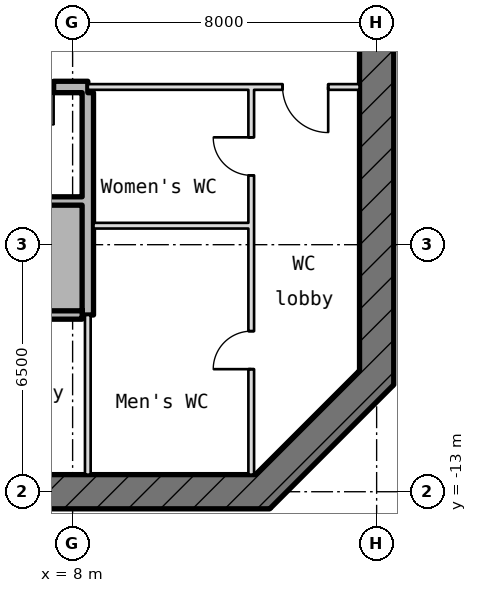
"""IFC4 building model, lengths in metres.
Left out: names, types, materials, properties, quantities, classifications, styles, units other than length and angle.
Written with IfcOpenShell. Run it as: python <this file> out.ifc"""

import sys

from ifc_helpers import new_model, si_unit, direction, frame, frame_2d, origin, place, context, subcontext, project, spatial, rectangle, extrude, element, fill, save


model = new_model("IFC4")
c1 = context("Model", 3, precision=1e-05, world=origin(), true_north=direction((0.0, 1.0)))
c2 = subcontext(c1, "Body", "Model", "MODEL_VIEW")
j1 = project(units=[si_unit("LENGTHUNIT", "METRE"), si_unit("PLANEANGLEUNIT", "RADIAN")], contexts=[c1])
p1 = place(None, origin())
s1 = spatial("IfcSite", under=j1, at=p1, CompositionType="ELEMENT")
p2 = place(p1, origin())
s2 = spatial("IfcBuilding", under=s1, at=p2, CompositionType="ELEMENT")
p3 = place(p2, frame((0.0, 0.0, 161.05)))
s3 = spatial("IfcBuildingStorey", under=s2, at=p3, CompositionType="ELEMENT", Elevation=161.05)
p4 = place(p3, frame((12.868, -13.132, -0.18), z_axis=(0.0, 0.0, 1.0), x_axis=(0.707106781187, 0.707106781187, 0.0)))
e1 = element("IfcWall", 1, at=p4, inside=s3, PredefinedType="SHEAR", context=c2, shape_type="SweptSolid", body=[
    extrude(rectangle(XDim=4.615, YDim=0.9, at=frame_2d((2.308, 0.0))), origin(), (0.0, 0.0, 1.0), 4.15),
])
p5 = place(p3, frame((16.0, -10.186, -0.18), z_axis=(0.0, 0.0, 1.0), x_axis=(0.0, 1.0, 0.0)))
e2 = element("IfcWall", 2, at=p5, inside=s3, PredefinedType="SHEAR", context=c2, shape_type="SweptSolid", body=[
    extrude(rectangle(XDim=20.373, YDim=0.9, at=frame_2d((10.186, 0.0))), origin(), (0.0, 0.0, 1.0), 4.15),
])
p6 = place(p5, frame((8.986, 0.0, 0.18)))
e3 = element("IfcOpeningElement", 3, at=p6, cuts=e2, PredefinedType="OPENING", context=c2, shape_type="SweptSolid", body=[
    extrude(rectangle(XDim=2.4, YDim=2.1, at=frame_2d((1.2, 1.05))), frame((0.0, 0.46, 0.0), z_axis=(0.0, -1.0, 0.0), x_axis=(1.0, 0.0, 0.0)), (0.0, 0.0, 1.0), 0.92),
])
p7 = place(p5, frame((13.586, 0.0, 0.18)))
e4 = element("IfcOpeningElement", 4, at=p7, cuts=e2, PredefinedType="OPENING", context=c2, shape_type="SweptSolid", body=[
    extrude(rectangle(XDim=1.2, YDim=2.1, at=frame_2d((0.6, 1.05))), frame((0.0, 0.46, 0.0), z_axis=(0.0, -1.0, 0.0), x_axis=(1.0, 0.0, 0.0)), (0.0, 0.0, 1.0), 0.92),
])
p8 = place(p3, frame((-13.186, -13.0, -0.18), z_axis=(0.0, 0.0, 1.0), x_axis=(1.0, 0.0, 0.0)))
e5 = element("IfcWall", 5, at=p8, inside=s3, PredefinedType="SHEAR", context=c2, shape_type="SweptSolid", body=[
    extrude(rectangle(XDim=26.373, YDim=0.9, at=frame_2d((13.186, 0.0))), origin(), (0.0, 0.0, 1.0), 4.15),
])
p9 = place(p8, frame((2.886, 0.0, 0.18)))
e6 = element("IfcOpeningElement", 6, at=p9, cuts=e5, PredefinedType="OPENING", context=c2, shape_type="SweptSolid", body=[
    extrude(rectangle(XDim=1.2, YDim=2.1, at=frame_2d((0.6, 1.05))), frame((0.0, 0.46, 0.0), z_axis=(0.0, -1.0, 0.0), x_axis=(1.0, 0.0, 0.0)), (0.0, 0.0, 1.0), 0.92),
])
p10 = place(p8, frame((6.886, 0.0, 0.18)))
e7 = element("IfcOpeningElement", 7, at=p10, cuts=e5, PredefinedType="OPENING", context=c2, shape_type="SweptSolid", body=[
    extrude(rectangle(XDim=1.4, YDim=2.1, at=frame_2d((0.7, 1.05))), frame((0.0, 0.46, 0.0), z_axis=(0.0, -1.0, 0.0), x_axis=(1.0, 0.0, 0.0)), (0.0, 0.0, 1.0), 0.92),
])
p11 = place(p8, frame((15.486, 0.0, 0.18)))
e8 = element("IfcOpeningElement", 8, at=p11, cuts=e5, PredefinedType="OPENING", context=c2, shape_type="SweptSolid", body=[
    extrude(rectangle(XDim=1.4, YDim=2.1, at=frame_2d((0.7, 1.05))), frame((0.0, 0.46, 0.0), z_axis=(0.0, -1.0, 0.0), x_axis=(1.0, 0.0, 0.0)), (0.0, 0.0, 1.0), 0.92),
])
p12 = place(p3, frame((-2.69, -8.35, 0.0), z_axis=(0.0, 0.0, 1.0), x_axis=(1.0, 0.0, 0.0)))
e9 = element("IfcWall", 9, at=p12, inside=s3, PredefinedType="STANDARD", context=c2, shape_type="SweptSolid", body=[
    extrude(rectangle(XDim=10.94, YDim=0.22, at=frame_2d((5.47, 0.0))), origin(), (0.0, 0.0, 1.0), 3.97),
])
p13 = place(p12, frame((0.74, 0.0, 0.0)))
e10 = element("IfcOpeningElement", 10, at=p13, cuts=e9, PredefinedType="OPENING", context=c2, shape_type="SweptSolid", body=[
    extrude(rectangle(XDim=1.1, YDim=2.1, at=frame_2d((0.55, 1.05))), frame((0.0, 0.12, 0.0), z_axis=(0.0, -1.0, 0.0), x_axis=(1.0, 0.0, 0.0)), (0.0, 0.0, 1.0), 0.24),
])
p14 = place(p12, frame((3.54, 0.0, 0.0)))
e11 = element("IfcOpeningElement", 11, at=p14, cuts=e9, PredefinedType="OPENING", context=c2, shape_type="SweptSolid", body=[
    extrude(rectangle(XDim=1.1, YDim=2.1, at=frame_2d((0.55, 1.05))), frame((0.0, 0.12, 0.0), z_axis=(0.0, -1.0, 0.0), x_axis=(1.0, 0.0, 0.0)), (0.0, 0.0, 1.0), 0.24),
])
p15 = place(p3, frame((8.55, -6.0, 0.0), z_axis=(0.0, 0.0, 1.0), x_axis=(1.0, 0.0, 0.0)))
e12 = element("IfcWall", 12, at=p15, inside=s3, PredefinedType="PARTITIONING", context=c2, shape_type="SweptSolid", body=[
    extrude(rectangle(XDim=4.075, YDim=0.15, at=frame_2d((2.038, 0.0))), origin(), (0.0, 0.0, 1.0), 3.97),
])
p16 = place(p3, frame((-8.25, -5.35, 0.0), z_axis=(0.0, 0.0, 1.0), x_axis=(1.0, 0.0, 0.0)))
e13 = element("IfcWall", 13, at=p16, inside=s3, PredefinedType="STANDARD", context=c2, shape_type="SweptSolid", body=[
    extrude(rectangle(XDim=16.5, YDim=0.22, at=frame_2d((8.25, 0.0))), origin(), (0.0, 0.0, 1.0), 3.97),
])
p17 = place(p3, frame((-8.4, -2.35, -0.18), z_axis=(0.0, 0.0, 1.0), x_axis=(1.0, 0.0, 0.0)))
e14 = element("IfcWall", 14, at=p17, inside=s3, PredefinedType="SHEAR", context=c2, shape_type="SweptSolid", body=[
    extrude(rectangle(XDim=16.8, YDim=0.3, at=frame_2d((8.4, 0.0))), origin(), (0.0, 0.0, 1.0), 4.15),
])
p18 = place(p17, frame((0.9, 0.0, 0.18)))
e15 = element("IfcOpeningElement", 15, at=p18, cuts=e14, PredefinedType="OPENING", context=c2, shape_type="SweptSolid", body=[
    extrude(rectangle(XDim=1.0, YDim=2.1, at=frame_2d((0.5, 1.05))), frame((0.0, 0.16, 0.0), z_axis=(0.0, -1.0, 0.0), x_axis=(1.0, 0.0, 0.0)), (0.0, 0.0, 1.0), 0.32),
])
p19 = place(p17, frame((14.9, 0.0, 0.18)))
e16 = element("IfcOpeningElement", 16, at=p19, cuts=e14, PredefinedType="OPENING", context=c2, shape_type="SweptSolid", body=[
    extrude(rectangle(XDim=1.0, YDim=2.1, at=frame_2d((0.5, 1.05))), frame((0.0, 0.16, 0.0), z_axis=(0.0, -1.0, 0.0), x_axis=(1.0, 0.0, 0.0)), (0.0, 0.0, 1.0), 0.32),
])
p20 = place(p3, frame((8.4, -2.35, 0.0), z_axis=(0.0, 0.0, 1.0), x_axis=(1.0, 0.0, 0.0)))
e17 = element("IfcWall", 17, at=p20, inside=s3, PredefinedType="PARTITIONING", context=c2, shape_type="SweptSolid", body=[
    extrude(rectangle(XDim=7.15, YDim=0.15, at=frame_2d((3.575, 0.0))), origin(), (0.0, 0.0, 1.0), 3.97),
])
p21 = place(p20, frame((5.125, 0.0, 0.0)))
e18 = element("IfcOpeningElement", 18, at=p21, cuts=e17, PredefinedType="OPENING", context=c2, shape_type="SweptSolid", body=[
    extrude(rectangle(XDim=1.2, YDim=2.1, at=frame_2d((0.6, 1.05))), frame((0.0, 0.085, 0.0), z_axis=(0.0, -1.0, 0.0), x_axis=(1.0, 0.0, 0.0)), (0.0, 0.0, 1.0), 0.17),
])
p22 = place(p3, frame((8.4, -12.55, 0.0), z_axis=(0.0, 0.0, 1.0), x_axis=(0.0, 1.0, 0.0)))
e19 = element("IfcWall", 19, at=p22, inside=s3, PredefinedType="PARTITIONING", context=c2, shape_type="SweptSolid", body=[
    extrude(rectangle(XDim=4.2, YDim=0.15, at=frame_2d((2.1, 0.0))), origin(), (0.0, 0.0, 1.0), 3.97),
])
p23 = place(p3, frame((8.4, -8.35, -0.18), z_axis=(0.0, 0.0, 1.0), x_axis=(0.0, 1.0, 0.0)))
e20 = element("IfcWall", 20, at=p23, inside=s3, PredefinedType="SHEAR", context=c2, shape_type="SweptSolid", body=[
    extrude(rectangle(XDim=5.85, YDim=0.3, at=frame_2d((2.925, 0.0))), origin(), (0.0, 0.0, 1.0), 4.15),
])
p24 = place(p3, frame((12.7, -12.55, 0.0), z_axis=(0.0, 0.0, 1.0), x_axis=(0.0, 1.0, 0.0)))
e21 = element("IfcWall", 21, at=p24, inside=s3, PredefinedType="PARTITIONING", context=c2, shape_type="SweptSolid", body=[
    extrude(rectangle(XDim=10.125, YDim=0.15, at=frame_2d((5.062, 0.0))), origin(), (0.0, 0.0, 1.0), 3.97),
])
p25 = place(p24, frame((7.875, 0.0, 0.0)))
e22 = element("IfcOpeningElement", 22, at=p25, cuts=e21, PredefinedType="OPENING", context=c2, shape_type="SweptSolid", body=[
    extrude(rectangle(XDim=1.0, YDim=2.1, at=frame_2d((0.5, 1.05))), frame((0.0, 0.085, 0.0), z_axis=(0.0, -1.0, 0.0), x_axis=(1.0, 0.0, 0.0)), (0.0, 0.0, 1.0), 0.17),
])
p26 = place(p24, frame((2.775, 0.0, 0.0)))
e23 = element("IfcOpeningElement", 23, at=p26, cuts=e21, PredefinedType="OPENING", context=c2, shape_type="SweptSolid", body=[
    extrude(rectangle(XDim=1.0, YDim=2.1, at=frame_2d((0.5, 1.05))), frame((0.0, 0.085, 0.0), z_axis=(0.0, -1.0, 0.0), x_axis=(1.0, 0.0, 0.0)), (0.0, 0.0, 1.0), 0.17),
])
p27 = place(p19, frame((1.0, 0.0, 0.0), z_axis=(0.0, 0.0, 1.0), x_axis=(-1.0, 0.0, 0.0)))
e24 = element("IfcDoor", 24, at=p27, inside=s3, OperationType="SINGLE_SWING_LEFT", PredefinedType="DOOR", context=c2, shape_type="SweptSolid", body=[
    extrude(rectangle(XDim=1.0, YDim=2.1, at=frame_2d((0.5, 1.05))), frame((0.0, 0.025, 0.0), z_axis=(0.0, -1.0, 0.0), x_axis=(1.0, 0.0, 0.0)), (0.0, 0.0, 1.0), 0.05),
])
fill(e16, e24)
p28 = place(p21, frame((1.2, 0.0, 0.0), z_axis=(0.0, 0.0, 1.0), x_axis=(-1.0, 0.0, 0.0)))
e25 = element("IfcDoor", 25, at=p28, inside=s3, OperationType="SINGLE_SWING_LEFT", PredefinedType="DOOR", context=c2, shape_type="SweptSolid", body=[
    extrude(rectangle(XDim=1.2, YDim=2.1, at=frame_2d((0.6, 1.05))), frame((0.0, 0.025, 0.0), z_axis=(0.0, -1.0, 0.0), x_axis=(1.0, 0.0, 0.0)), (0.0, 0.0, 1.0), 0.05),
])
fill(e18, e25)
p29 = place(p25, origin())
e26 = element("IfcDoor", 26, at=p29, inside=s3, OperationType="SINGLE_SWING_RIGHT", PredefinedType="DOOR", context=c2, shape_type="SweptSolid", body=[
    extrude(rectangle(XDim=1.0, YDim=2.1, at=frame_2d((0.5, 1.05))), frame((0.0, 0.025, 0.0), z_axis=(0.0, -1.0, 0.0), x_axis=(1.0, 0.0, 0.0)), (0.0, 0.0, 1.0), 0.05),
])
fill(e22, e26)
p30 = place(p26, origin())
e27 = element("IfcDoor", 27, at=p30, inside=s3, OperationType="SINGLE_SWING_RIGHT", PredefinedType="DOOR", context=c2, shape_type="SweptSolid", body=[
    extrude(rectangle(XDim=1.0, YDim=2.1, at=frame_2d((0.5, 1.05))), frame((0.0, 0.025, 0.0), z_axis=(0.0, -1.0, 0.0), x_axis=(1.0, 0.0, 0.0)), (0.0, 0.0, 1.0), 0.05),
])
fill(e23, e27)
save(model, sys.argv[1])
